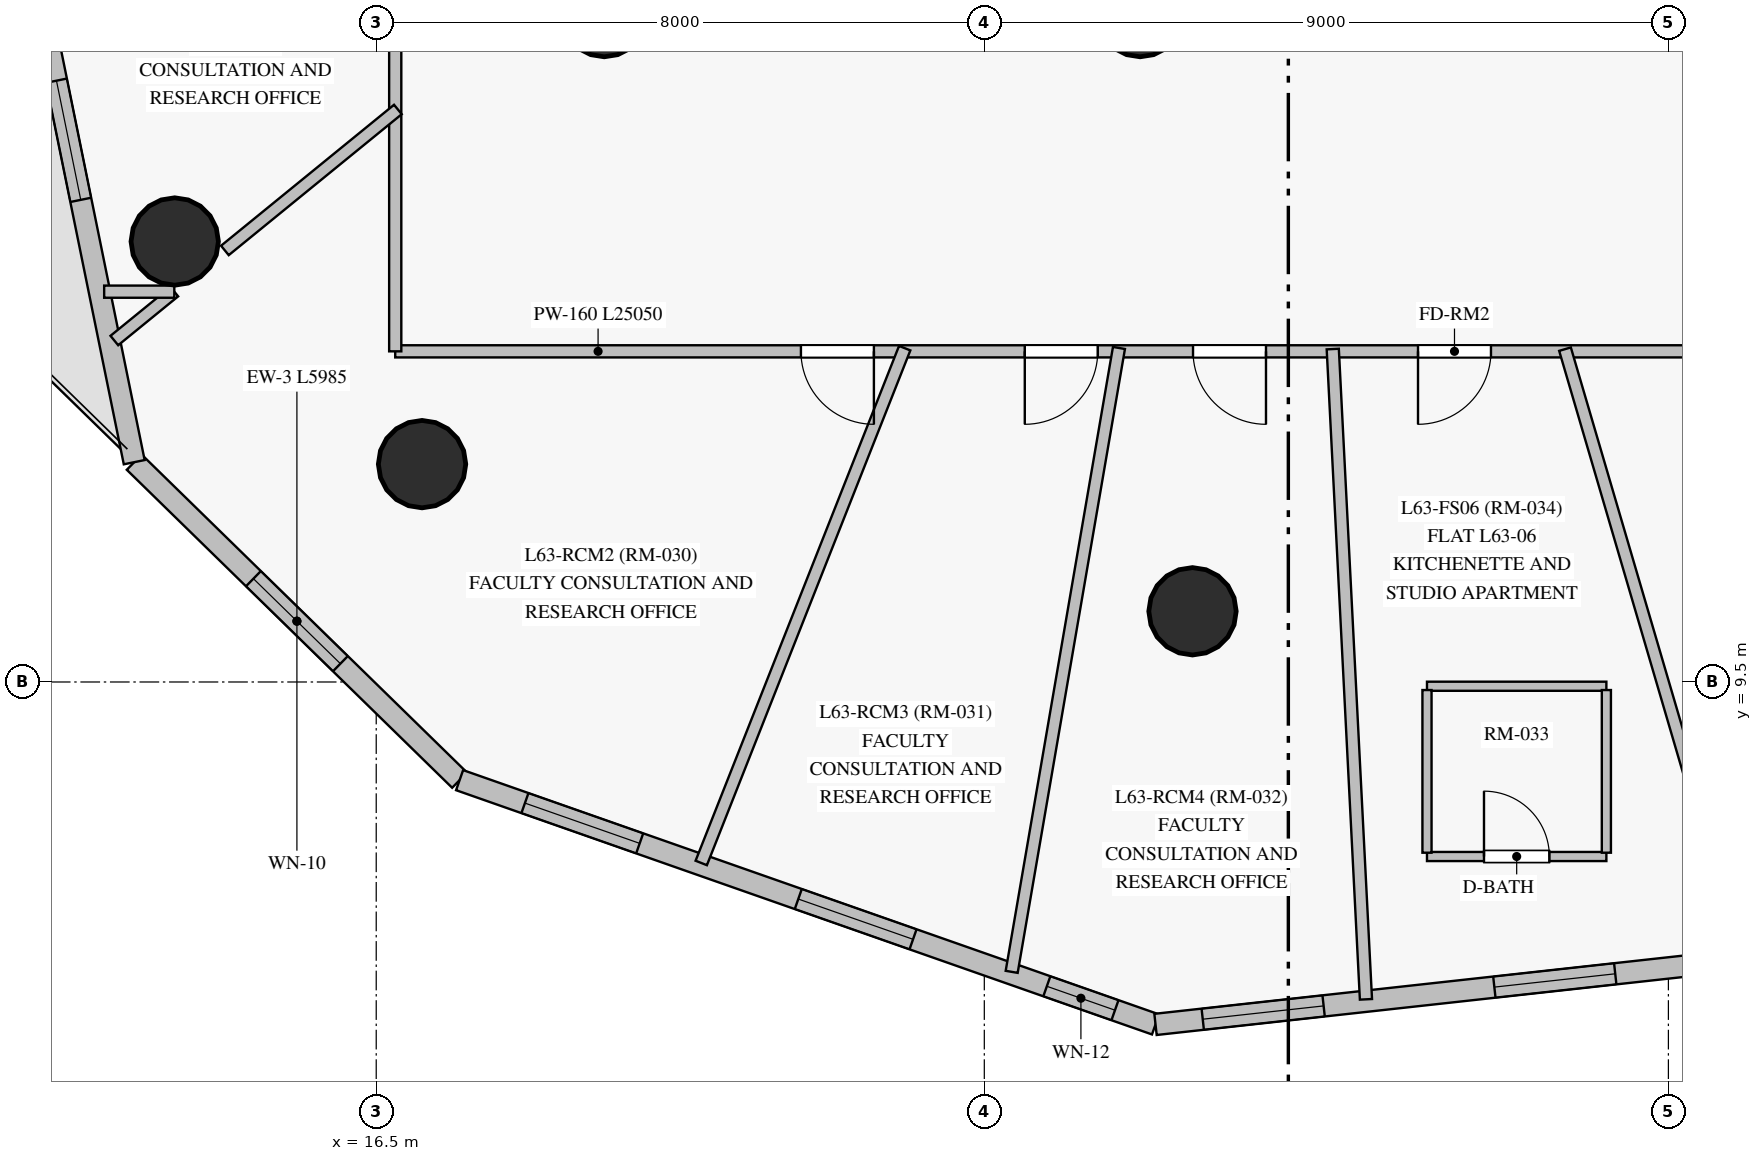
"""IFC4 building model, lengths in metres.
Left out: names, types, materials, properties, quantities, classifications, styles, units other than length and angle.
Written with IfcOpenShell. Run it as: python <this file> out.ifc"""

import sys

from ifc_helpers import new_model, si_unit, direction, frame, frame_2d, origin, origin_with_axes, origin_2d, place, context, subcontext, project, spatial, rectangle, circle, extrude, source, transform, mapped, element, fill, save


model = new_model("IFC4")
c1 = context("Model", 3, precision=1e-05, world=origin(), true_north=direction((0.0, 1.0)))
c2 = subcontext(c1, "Body", "Model", "MODEL_VIEW")
j1 = project(units=[si_unit("LENGTHUNIT", "METRE"), si_unit("PLANEANGLEUNIT", "RADIAN")], contexts=[c1])
p1 = place(None, origin())
s1 = spatial("IfcSite", under=j1, at=p1, CompositionType="ELEMENT")
p2 = place(p1, origin())
s2 = spatial("IfcBuilding", under=s1, at=p2, CompositionType="ELEMENT")
p3 = place(p2, frame((0.0, 0.0, 216.9)))
s3 = spatial("IfcBuildingStorey", under=s2, at=p3, CompositionType="ELEMENT", Elevation=216.9)
m1 = source(origin_with_axes(), c2, "Body", "SweptSolid", [
    extrude(circle(Radius=0.575, at=origin_2d()), origin(), (0.0, 0.0, 1.0), 3.05),
])
for number, where, z_axis, x_axis in (
    (1, (19.5, 18.3, 0.0), (0.0, 0.0, 1.0), (1.0, 0.0, 0.0)),
    (2, (26.55, 18.3, 0.0), (0.0, 0.0, 1.0), (1.0, 0.0, 0.0)),
    (3, (13.849, 15.295, 0.0), (0.0, 0.0, 1.0), (1.0, 0.0, 0.0)),
    (4, (17.103, 12.366, 0.0), (0.0, 0.0, 1.0), (1.0, 0.0, 0.0)),
    (5, (27.239, 10.43, 0.0), (0.0, 0.0, 1.0), (1.0, 0.0, 0.0)),
):
    element("IfcColumn", number, at=place(p3, frame(where, z_axis=z_axis, x_axis=x_axis)), inside=s3, PredefinedType="COLUMN", context=c2, shape_type="MappedRepresentation", body=[
        mapped(m1, transform((0.0, 0.0, 0.0), scale=1.0)),
    ])
p4 = place(p3, frame((13.316, 12.392, 0.0), z_axis=(0.0, 0.0, 1.0), x_axis=(0.715217786387, -0.69890165119, 0.0)))
e6 = element("IfcWall", 6, at=p4, inside=s3, PredefinedType="SOLIDWALL", context=c2, shape_type="SweptSolid", body=[
    extrude(rectangle(XDim=5.985, YDim=0.28, at=frame_2d((2.993, 0.0))), origin(), (0.0, 0.0, 1.0), 2.85),
])
p5 = place(p4, frame((2.193, 0.0, 0.85)))
e7 = element("IfcOpeningElement", 7, at=p5, cuts=e6, PredefinedType="OPENING", context=c2, shape_type="SweptSolid", body=[
    extrude(rectangle(XDim=1.6, YDim=1.6, at=frame_2d((0.8, 0.8))), frame((0.0, 0.15, 0.0), z_axis=(0.0, -1.0, 0.0), x_axis=(1.0, 0.0, 0.0)), (0.0, 0.0, 1.0), 0.3),
])
p6 = place(p3, frame((17.597, 8.208, 0.0), z_axis=(0.0, 0.0, 1.0), x_axis=(0.943570466197, -0.331171821447, 0.0)))
e8 = element("IfcWall", 8, at=p6, inside=s3, PredefinedType="SOLIDWALL", context=c2, shape_type="SweptSolid", body=[
    extrude(rectangle(XDim=9.703, YDim=0.28, at=frame_2d((4.852, 0.0))), origin(), (0.0, 0.0, 1.0), 2.85),
])
p7 = place(p6, frame((0.911, 0.0, 0.85)))
e9 = element("IfcOpeningElement", 9, at=p7, cuts=e8, PredefinedType="OPENING", context=c2, shape_type="SweptSolid", body=[
    extrude(rectangle(XDim=1.6, YDim=1.6, at=frame_2d((0.8, 0.8))), frame((0.0, 0.15, 0.0), z_axis=(0.0, -1.0, 0.0), x_axis=(1.0, 0.0, 0.0)), (0.0, 0.0, 1.0), 0.3),
])
p8 = place(p6, frame((4.722, 0.0, 0.85)))
e10 = element("IfcOpeningElement", 10, at=p8, cuts=e8, PredefinedType="OPENING", context=c2, shape_type="SweptSolid", body=[
    extrude(rectangle(XDim=1.6, YDim=1.6, at=frame_2d((0.8, 0.8))), frame((0.0, 0.15, 0.0), z_axis=(0.0, -1.0, 0.0), x_axis=(1.0, 0.0, 0.0)), (0.0, 0.0, 1.0), 0.3),
])
p9 = place(p6, frame((8.188, 0.0, 0.85)))
e11 = element("IfcOpeningElement", 11, at=p9, cuts=e8, PredefinedType="OPENING", context=c2, shape_type="SweptSolid", body=[
    extrude(rectangle(XDim=0.95, YDim=1.5, at=frame_2d((0.475, 0.75))), frame((0.0, 0.15, 0.0), z_axis=(0.0, -1.0, 0.0), x_axis=(1.0, 0.0, 0.0)), (0.0, 0.0, 1.0), 0.3),
])
p10 = place(p3, frame((26.752, 4.995, 0.0), z_axis=(0.0, 0.0, 1.0), x_axis=(0.993993885495, 0.10943562308, 0.0)))
e12 = element("IfcWall", 12, at=p10, inside=s3, PredefinedType="SOLIDWALL", context=c2, shape_type="SweptSolid", body=[
    extrude(rectangle(XDim=12.727, YDim=0.28, at=frame_2d((6.364, 0.0))), origin(), (0.0, 0.0, 1.0), 2.85),
])
p11 = place(p10, frame((0.625, 0.0, 0.85)))
e13 = element("IfcOpeningElement", 13, at=p11, cuts=e12, PredefinedType="OPENING", context=c2, shape_type="SweptSolid", body=[
    extrude(rectangle(XDim=1.6, YDim=1.6, at=frame_2d((0.8, 0.8))), frame((0.0, 0.15, 0.0), z_axis=(0.0, -1.0, 0.0), x_axis=(1.0, 0.0, 0.0)), (0.0, 0.0, 1.0), 0.3),
])
p12 = place(p10, frame((4.485, 0.0, 0.85)))
e14 = element("IfcOpeningElement", 14, at=p12, cuts=e12, PredefinedType="OPENING", context=c2, shape_type="SweptSolid", body=[
    extrude(rectangle(XDim=1.6, YDim=1.6, at=frame_2d((0.8, 0.8))), frame((0.0, 0.15, 0.0), z_axis=(0.0, -1.0, 0.0), x_axis=(1.0, 0.0, 0.0)), (0.0, 0.0, 1.0), 0.3),
])
p13 = place(p10, frame((9.423, 0.0, 0.85)))
e15 = element("IfcOpeningElement", 15, at=p13, cuts=e12, PredefinedType="OPENING", context=c2, shape_type="SweptSolid", body=[
    extrude(rectangle(XDim=1.6, YDim=1.6, at=frame_2d((0.8, 0.8))), frame((0.0, 0.15, 0.0), z_axis=(0.0, -1.0, 0.0), x_axis=(1.0, 0.0, 0.0)), (0.0, 0.0, 1.0), 0.3),
])
p14 = place(p3, frame((9.006, 33.54, 0.0), z_axis=(0.0, 0.0, 1.0), x_axis=(0.19971489877, -0.979854049953, 0.0)))
e16 = element("IfcWall", 16, at=p14, inside=s3, PredefinedType="SOLIDWALL", context=c2, shape_type="SweptSolid", body=[
    extrude(rectangle(XDim=21.583, YDim=0.28, at=frame_2d((10.792, 0.0))), origin(), (0.0, 0.0, 1.0), 2.85),
])
p15 = place(p14, frame((4.775, 0.0, 0.85)))
e17 = element("IfcOpeningElement", 17, at=p15, cuts=e16, PredefinedType="OPENING", context=c2, shape_type="SweptSolid", body=[
    extrude(rectangle(XDim=1.6, YDim=1.6, at=frame_2d((0.8, 0.8))), frame((0.0, 0.15, 0.0), z_axis=(0.0, -1.0, 0.0), x_axis=(1.0, 0.0, 0.0)), (0.0, 0.0, 1.0), 0.3),
])
p16 = place(p14, frame((8.884, 0.0, 0.85)))
e18 = element("IfcOpeningElement", 18, at=p16, cuts=e16, PredefinedType="OPENING", context=c2, shape_type="SweptSolid", body=[
    extrude(rectangle(XDim=1.6, YDim=1.6, at=frame_2d((0.8, 0.8))), frame((0.0, 0.15, 0.0), z_axis=(0.0, -1.0, 0.0), x_axis=(1.0, 0.0, 0.0)), (0.0, 0.0, 1.0), 0.3),
])
p17 = place(p14, frame((12.359, 0.0, 0.85)))
e19 = element("IfcOpeningElement", 19, at=p17, cuts=e16, PredefinedType="OPENING", context=c2, shape_type="SweptSolid", body=[
    extrude(rectangle(XDim=1.6, YDim=1.6, at=frame_2d((0.8, 0.8))), frame((0.0, 0.15, 0.0), z_axis=(0.0, -1.0, 0.0), x_axis=(1.0, 0.0, 0.0)), (0.0, 0.0, 1.0), 0.3),
])
p18 = place(p14, frame((16.461, 0.0, 0.85)))
e20 = element("IfcOpeningElement", 20, at=p18, cuts=e16, PredefinedType="OPENING", context=c2, shape_type="SweptSolid", body=[
    extrude(rectangle(XDim=1.6, YDim=1.6, at=frame_2d((0.8, 0.8))), frame((0.0, 0.15, 0.0), z_axis=(0.0, -1.0, 0.0), x_axis=(1.0, 0.0, 0.0)), (0.0, 0.0, 1.0), 0.3),
])
p19 = place(p14, frame((1.274, 0.0, 0.0)))
e21 = element("IfcOpeningElement", 21, at=p19, cuts=e16, PredefinedType="OPENING", context=c2, shape_type="SweptSolid", body=[
    extrude(rectangle(XDim=1.05, YDim=2.12, at=frame_2d((0.525, 1.06))), frame((0.0, 0.15, 0.0), z_axis=(0.0, -1.0, 0.0), x_axis=(1.0, 0.0, 0.0)), (0.0, 0.0, 1.0), 0.3),
])
p20 = place(p3, frame((41.8, 13.85, 0.0), z_axis=(0.0, 0.0, 1.0), x_axis=(-1.0, 0.0, 0.0)))
e22 = element("IfcWall", 22, at=p20, inside=s3, PredefinedType="PARTITIONING", context=c2, shape_type="SweptSolid", body=[
    extrude(rectangle(XDim=25.05, YDim=0.16, at=frame_2d((12.525, 0.0))), origin(), (0.0, 0.0, 1.0), 2.3),
])
p21 = place(p20, frame((10.634, 0.0, 0.0)))
e23 = element("IfcOpeningElement", 23, at=p21, cuts=e22, PredefinedType="OPENING", context=c2, shape_type="SweptSolid", body=[
    extrude(rectangle(XDim=0.96, YDim=2.15, at=frame_2d((0.48, 1.075))), frame((0.0, 0.09, 0.0), z_axis=(0.0, -1.0, 0.0), x_axis=(1.0, 0.0, 0.0)), (0.0, 0.0, 1.0), 0.18),
])
p22 = place(p20, frame((6.48, 0.0, 0.0)))
e24 = element("IfcOpeningElement", 24, at=p22, cuts=e22, PredefinedType="OPENING", context=c2, shape_type="SweptSolid", body=[
    extrude(rectangle(XDim=0.96, YDim=2.15, at=frame_2d((0.48, 1.075))), frame((0.0, 0.09, 0.0), z_axis=(0.0, -1.0, 0.0), x_axis=(1.0, 0.0, 0.0)), (0.0, 0.0, 1.0), 0.18),
])
p23 = place(p20, frame((18.752, 0.0, 0.0)))
e25 = element("IfcOpeningElement", 25, at=p23, cuts=e22, PredefinedType="OPENING", context=c2, shape_type="SweptSolid", body=[
    extrude(rectangle(XDim=0.96, YDim=2.15, at=frame_2d((0.48, 1.075))), frame((0.0, 0.09, 0.0), z_axis=(0.0, -1.0, 0.0), x_axis=(1.0, 0.0, 0.0)), (0.0, 0.0, 1.0), 0.18),
])
p24 = place(p20, frame((15.808, 0.0, 0.0)))
e26 = element("IfcOpeningElement", 26, at=p24, cuts=e22, PredefinedType="OPENING", context=c2, shape_type="SweptSolid", body=[
    extrude(rectangle(XDim=0.96, YDim=2.15, at=frame_2d((0.48, 1.075))), frame((0.0, 0.09, 0.0), z_axis=(0.0, -1.0, 0.0), x_axis=(1.0, 0.0, 0.0)), (0.0, 0.0, 1.0), 0.18),
])
p25 = place(p20, frame((13.594, 0.0, 0.0)))
e27 = element("IfcOpeningElement", 27, at=p25, cuts=e22, PredefinedType="OPENING", context=c2, shape_type="SweptSolid", body=[
    extrude(rectangle(XDim=0.96, YDim=2.15, at=frame_2d((0.48, 1.075))), frame((0.0, 0.09, 0.0), z_axis=(0.0, -1.0, 0.0), x_axis=(1.0, 0.0, 0.0)), (0.0, 0.0, 1.0), 0.18),
])
p26 = place(p20, frame((1.822, 0.0, 0.0)))
e28 = element("IfcOpeningElement", 28, at=p26, cuts=e22, PredefinedType="OPENING", context=c2, shape_type="SweptSolid", body=[
    extrude(rectangle(XDim=0.96, YDim=2.15, at=frame_2d((0.48, 1.075))), frame((0.0, 0.09, 0.0), z_axis=(0.0, -1.0, 0.0), x_axis=(1.0, 0.0, 0.0)), (0.0, 0.0, 1.0), 0.18),
])
p27 = place(p3, frame((16.75, 13.85, 0.0), z_axis=(0.0, 0.0, 1.0), x_axis=(0.0, 1.0, 0.0)))
e29 = element("IfcWall", 29, at=p27, inside=s3, PredefinedType="PARTITIONING", context=c2, shape_type="SweptSolid", body=[
    extrude(rectangle(XDim=17.8, YDim=0.16, at=frame_2d((8.9, 0.0))), origin(), (0.0, 0.0, 1.0), 2.45),
])
p28 = place(p27, frame((8.425, 0.0, 0.0)))
e30 = element("IfcOpeningElement", 30, at=p28, cuts=e29, PredefinedType="OPENING", context=c2, shape_type="SweptSolid", body=[
    extrude(rectangle(XDim=0.96, YDim=2.15, at=frame_2d((0.48, 1.075))), frame((0.0, 0.09, 0.0), z_axis=(0.0, -1.0, 0.0), x_axis=(1.0, 0.0, 0.0)), (0.0, 0.0, 1.0), 0.18),
])
p29 = place(p27, frame((5.615, 0.0, 0.0)))
e31 = element("IfcOpeningElement", 31, at=p29, cuts=e29, PredefinedType="OPENING", context=c2, shape_type="SweptSolid", body=[
    extrude(rectangle(XDim=0.96, YDim=2.15, at=frame_2d((0.48, 1.075))), frame((0.0, 0.09, 0.0), z_axis=(0.0, -1.0, 0.0), x_axis=(1.0, 0.0, 0.0)), (0.0, 0.0, 1.0), 0.18),
])
p30 = place(p27, frame((12.875, 0.0, 0.0)))
e32 = element("IfcOpeningElement", 32, at=p30, cuts=e29, PredefinedType="OPENING", context=c2, shape_type="SweptSolid", body=[
    extrude(rectangle(XDim=0.96, YDim=2.15, at=frame_2d((0.48, 1.075))), frame((0.0, 0.09, 0.0), z_axis=(0.0, -1.0, 0.0), x_axis=(1.0, 0.0, 0.0)), (0.0, 0.0, 1.0), 0.18),
])
p31 = place(p3, frame((29.084, 13.88, 0.0), z_axis=(0.0, 0.0, 1.0), x_axis=(0.050989521913, -0.998699188272, 0.0)))
e33 = element("IfcWall", 33, at=p31, inside=s3, PredefinedType="PARTITIONING", context=c2, shape_type="SweptSolid", body=[
    extrude(rectangle(XDim=8.566, YDim=0.16, at=frame_2d((4.283, 0.0))), origin(), (0.0, 0.0, 1.0), 2.85),
])
p32 = place(p3, frame((32.14, 13.879, 0.0), z_axis=(0.0, 0.0, 1.0), x_axis=(0.281466023859, -0.959571194552, 0.0)))
e34 = element("IfcWall", 34, at=p32, inside=s3, PredefinedType="PARTITIONING", context=c2, shape_type="SweptSolid", body=[
    extrude(rectangle(XDim=8.344, YDim=0.16, at=frame_2d((4.172, 0.0))), origin(), (0.0, 0.0, 1.0), 2.85),
])
p33 = place(p3, frame((26.271, 13.894, 0.0), z_axis=(0.0, 0.0, 1.0), x_axis=(-0.169469072831, -0.985535505882, 0.0)))
e35 = element("IfcWall", 35, at=p33, inside=s3, PredefinedType="PARTITIONING", context=c2, shape_type="SweptSolid", body=[
    extrude(rectangle(XDim=8.328, YDim=0.16, at=frame_2d((4.164, 0.0))), origin(), (0.0, 0.0, 1.0), 2.35),
])
p34 = place(p3, frame((23.453, 13.892, 0.0), z_axis=(0.0, 0.0, 1.0), x_axis=(-0.367561121013, -0.929999366838, 0.0)))
e36 = element("IfcWall", 36, at=p34, inside=s3, PredefinedType="PARTITIONING", context=c2, shape_type="SweptSolid", body=[
    extrude(rectangle(XDim=7.282, YDim=0.16, at=frame_2d((3.641, 0.0))), origin(), (0.0, 0.0, 1.0), 2.85),
])
p35 = place(p3, frame((16.785, 17.032, 0.0), z_axis=(0.0, 0.0, 1.0), x_axis=(-0.775222919208, -0.631687759526, 0.0)))
e37 = element("IfcWall", 37, at=p35, inside=s3, PredefinedType="PARTITIONING", context=c2, shape_type="SweptSolid", body=[
    extrude(rectangle(XDim=2.936, YDim=0.16, at=frame_2d((1.468, 0.0))), origin(), (0.0, 0.0, 1.0), 2.35),
])
p36 = place(p3, frame((30.324, 7.204, 0.0), z_axis=(0.0, 0.0, 1.0), x_axis=(1.0, 0.0, 0.0)))
e38 = element("IfcWall", 38, at=p36, inside=s3, PredefinedType="PARTITIONING", context=c2, shape_type="SweptSolid", body=[
    extrude(rectangle(XDim=2.36, YDim=0.12, at=frame_2d((1.18, 0.0))), origin(), (0.0, 0.0, 1.0), 2.85),
])
p37 = place(p36, frame((0.75, 0.0, 0.0)))
e39 = element("IfcOpeningElement", 39, at=p37, cuts=e38, PredefinedType="OPENING", context=c2, shape_type="SweptSolid", body=[
    extrude(rectangle(XDim=0.86, YDim=2.1, at=frame_2d((0.43, 1.05))), frame((0.0, 0.07, 0.0), z_axis=(0.0, -1.0, 0.0), x_axis=(1.0, 0.0, 0.0)), (0.0, 0.0, 1.0), 0.14),
])
p38 = place(p3, frame((32.684, 9.444, 0.0), z_axis=(0.0, 0.0, 1.0), x_axis=(-1.0, 0.0, 0.0)))
e40 = element("IfcWall", 40, at=p38, inside=s3, PredefinedType="PARTITIONING", context=c2, shape_type="SweptSolid", body=[
    extrude(rectangle(XDim=2.36, YDim=0.12, at=frame_2d((1.18, 0.0))), origin(), (0.0, 0.0, 1.0), 2.85),
])
for number, where, z_axis, x_axis in (
    (41, (32.684, 7.254, 0.0), (0.0, 0.0, 1.0), (0.0, 1.0, 0.0)),
    (42, (30.324, 9.394, 0.0), (0.0, 0.0, 1.0), (0.0, -1.0, 0.0)),
):
    element("IfcWall", number, at=place(p3, frame(where, z_axis=z_axis, x_axis=x_axis)), inside=s3, PredefinedType="PARTITIONING", context=c2, shape_type="SweptSolid", body=[
        extrude(rectangle(XDim=2.14, YDim=0.12, at=frame_2d((1.07, 0.0))), origin(), (0.0, 0.0, 1.0), 2.85),
    ])
p39 = place(p3, frame((13.844, 14.635, 0.0), z_axis=(0.0, 0.0, 1.0), x_axis=(-0.775195820766, -0.631721013951, 0.0)))
e43 = element("IfcWall", 43, at=p39, inside=s3, PredefinedType="PARTITIONING", context=c2, shape_type="SweptSolid", body=[
    extrude(rectangle(XDim=1.018, YDim=0.16, at=frame_2d((0.509, 0.0))), origin(), (0.0, 0.0, 1.0), 2.85),
])
p40 = place(p3, frame((12.921, 14.635, 0.0), z_axis=(0.0, 0.0, 1.0), x_axis=(1.0, 0.0, 0.0)))
e44 = element("IfcWall", 44, at=p40, inside=s3, PredefinedType="PARTITIONING", context=c2, shape_type="SweptSolid", body=[
    extrude(rectangle(XDim=0.923, YDim=0.16, at=frame_2d((0.461, 0.0))), origin(), (0.0, 0.0, 1.0), 2.3),
])
m2 = source(origin_with_axes(), c2, "Body", "SweptSolid", [
    extrude(rectangle(XDim=1.6, YDim=1.6, at=frame_2d((0.8, 0.8))), frame((0.0, 0.03, 0.0), z_axis=(0.0, -1.0, 0.0), x_axis=(1.0, 0.0, 0.0)), (0.0, 0.0, 1.0), 0.06),
])
p41 = place(p5, origin())
e45 = element("IfcWindow", 45, at=p41, inside=s3, PartitioningType="SINGLE_PANEL", PredefinedType="WINDOW", context=c2, shape_type="MappedRepresentation", body=[
    mapped(m2, transform((0.0, 0.0, 0.0), scale=1.0)),
])
fill(e7, e45)
p42 = place(p7, origin())
e46 = element("IfcWindow", 46, at=p42, inside=s3, PartitioningType="SINGLE_PANEL", PredefinedType="WINDOW", context=c2, shape_type="MappedRepresentation", body=[
    mapped(m2, transform((0.0, 0.0, 0.0), scale=1.0)),
])
fill(e9, e46)
p43 = place(p8, origin())
e47 = element("IfcWindow", 47, at=p43, inside=s3, PartitioningType="SINGLE_PANEL", PredefinedType="WINDOW", context=c2, shape_type="MappedRepresentation", body=[
    mapped(m2, transform((0.0, 0.0, 0.0), scale=1.0)),
])
fill(e10, e47)
m3 = source(origin_with_axes(), c2, "Body", "SweptSolid", [
    extrude(rectangle(XDim=0.95, YDim=1.5, at=frame_2d((0.475, 0.75))), frame((0.0, 0.03, 0.0), z_axis=(0.0, -1.0, 0.0), x_axis=(1.0, 0.0, 0.0)), (0.0, 0.0, 1.0), 0.06),
])
p44 = place(p9, origin())
e48 = element("IfcWindow", 48, at=p44, inside=s3, PartitioningType="SINGLE_PANEL", PredefinedType="WINDOW", context=c2, shape_type="MappedRepresentation", body=[
    mapped(m3, transform((0.0, 0.0, 0.0), scale=1.0)),
])
fill(e11, e48)
p45 = place(p11, origin())
e49 = element("IfcWindow", 49, at=p45, inside=s3, PartitioningType="SINGLE_PANEL", PredefinedType="WINDOW", context=c2, shape_type="MappedRepresentation", body=[
    mapped(m2, transform((0.0, 0.0, 0.0), scale=1.0)),
])
fill(e13, e49)
p46 = place(p12, origin())
e50 = element("IfcWindow", 50, at=p46, inside=s3, PartitioningType="SINGLE_PANEL", PredefinedType="WINDOW", context=c2, shape_type="MappedRepresentation", body=[
    mapped(m2, transform((0.0, 0.0, 0.0), scale=1.0)),
])
fill(e14, e50)
p47 = place(p18, origin())
e51 = element("IfcWindow", 51, at=p47, inside=s3, PartitioningType="SINGLE_PANEL", PredefinedType="WINDOW", context=c2, shape_type="MappedRepresentation", body=[
    mapped(m2, transform((0.0, 0.0, 0.0), scale=1.0)),
])
fill(e20, e51)
m4 = source(origin_with_axes(), c2, "Body", "SweptSolid", [
    extrude(rectangle(XDim=0.86, YDim=2.1, at=frame_2d((0.43, 1.05))), frame((0.0, 0.025, 0.0), z_axis=(0.0, -1.0, 0.0), x_axis=(1.0, 0.0, 0.0)), (0.0, 0.0, 1.0), 0.05),
])
p48 = place(p37, origin())
e52 = element("IfcDoor", 52, at=p48, inside=s3, OperationType="SINGLE_SWING_LEFT", PredefinedType="DOOR", context=c2, shape_type="MappedRepresentation", body=[
    mapped(m4, transform((0.0, 0.0, 0.0), scale=1.0)),
])
fill(e39, e52)
m5 = source(origin_with_axes(), c2, "Body", "SweptSolid", [
    extrude(rectangle(XDim=0.96, YDim=2.15, at=frame_2d((0.48, 1.075))), frame((0.0, 0.025, 0.0), z_axis=(0.0, -1.0, 0.0), x_axis=(1.0, 0.0, 0.0)), (0.0, 0.0, 1.0), 0.05),
])
p49 = place(p21, origin())
e53 = element("IfcDoor", 53, at=p49, inside=s3, OperationType="SINGLE_SWING_RIGHT", PredefinedType="DOOR", context=c2, shape_type="MappedRepresentation", body=[
    mapped(m5, transform((0.0, 0.0, 0.0), scale=1.0)),
])
fill(e23, e53)
p50 = place(p23, origin())
e54 = element("IfcDoor", 54, at=p50, inside=s3, OperationType="SINGLE_SWING_LEFT", PredefinedType="DOOR", context=c2, shape_type="MappedRepresentation", body=[
    mapped(m5, transform((0.0, 0.0, 0.0), scale=1.0)),
])
fill(e25, e54)
p51 = place(p24, origin())
e55 = element("IfcDoor", 55, at=p51, inside=s3, OperationType="SINGLE_SWING_RIGHT", PredefinedType="DOOR", context=c2, shape_type="MappedRepresentation", body=[
    mapped(m5, transform((0.0, 0.0, 0.0), scale=1.0)),
])
fill(e26, e55)
p52 = place(p25, origin())
e56 = element("IfcDoor", 56, at=p52, inside=s3, OperationType="SINGLE_SWING_LEFT", PredefinedType="DOOR", context=c2, shape_type="MappedRepresentation", body=[
    mapped(m5, transform((0.0, 0.0, 0.0), scale=1.0)),
])
fill(e27, e56)
save(model, sys.argv[1])
